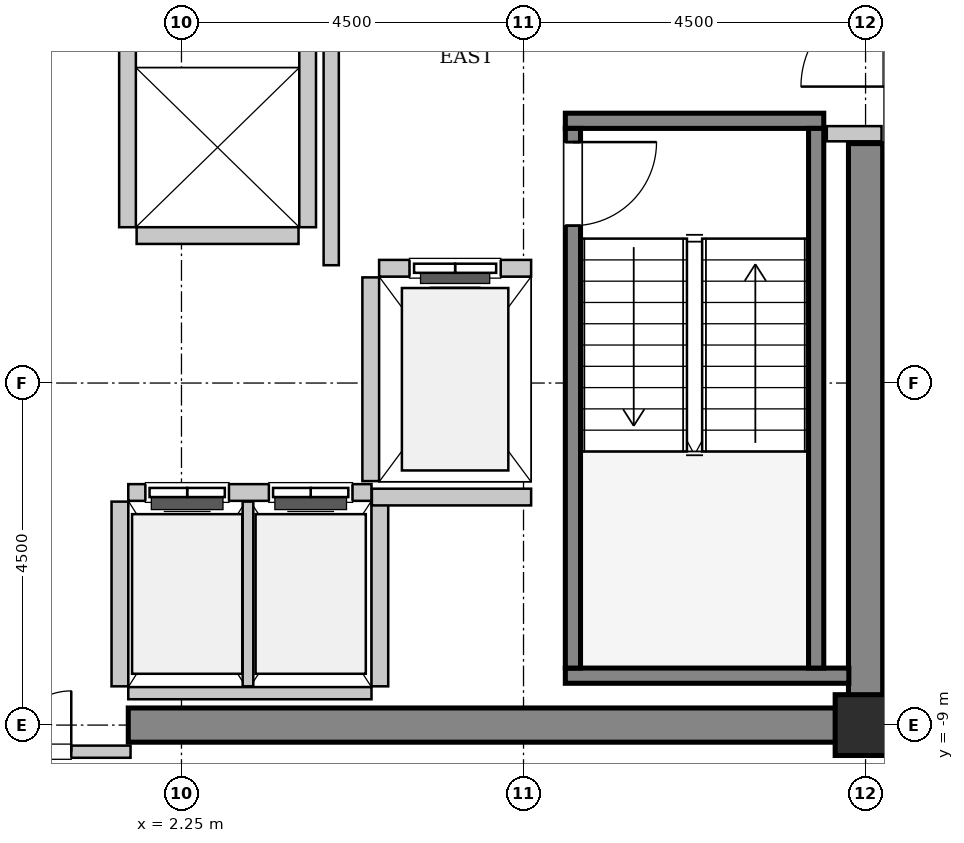
"""IFC4 building model, lengths in metres.
Left out: names, types, materials, properties, quantities, classifications, styles, units other than length and angle.
Written with IfcOpenShell. Run it as: python <this file> out.ifc"""

import sys

from ifc_helpers import new_model, si_unit, direction, frame, frame_2d, origin, origin_2d, place, context, subcontext, project, spatial, rectangle, hollow_rectangle, extrude, source, transform, mapped, element, fill, save


model = new_model("IFC4")
c1 = context("Model", 3, precision=1e-05, world=origin(), true_north=direction((0.0, 1.0)))
c2 = subcontext(c1, "Body", "Model", "MODEL_VIEW")
j1 = project(units=[si_unit("LENGTHUNIT", "METRE"), si_unit("PLANEANGLEUNIT", "RADIAN")], contexts=[c1])
p1 = place(None, origin())
s1 = spatial("IfcSite", under=j1, at=p1, CompositionType="ELEMENT")
p2 = place(p1, origin())
s2 = spatial("IfcBuilding", under=s1, at=p2, CompositionType="ELEMENT")
p3 = place(p2, frame((0.0, 0.0, 233.2)))
s3 = spatial("IfcBuildingStorey", under=s2, at=p3, CompositionType="ELEMENT", Elevation=233.2)
m1 = source(origin(), c2, "Body", "SweptSolid", [
    extrude(rectangle(XDim=9.925, YDim=0.45, at=frame_2d((4.962, 0.0))), origin(), (0.0, 0.0, 1.0), 3.8),
])
p4 = place(p3, frame((1.55, -9.0, 0.0), z_axis=(0.0, 0.0, 1.0), x_axis=(1.0, 0.0, 0.0)))
e1 = element("IfcWall", 1, at=p4, inside=s3, PredefinedType="SHEAR", context=c2, shape_type="MappedRepresentation", body=[
    mapped(m1, transform((0.0, 0.0, 0.0), x_axis=(1.0, 0.0, 0.0), y_axis=(0.0, 1.0, 0.0), z_axis=(0.0, 0.0, 1.0), scale=1.0)),
])
m2 = source(origin(), c2, "Body", "SweptSolid", [
    extrude(rectangle(XDim=7.425, YDim=0.45, at=frame_2d((3.712, 0.0))), origin(), (0.0, 0.0, 1.0), 3.8),
])
p5 = place(p3, frame((11.25, -8.775, 0.0), z_axis=(0.0, 0.0, 1.0), x_axis=(0.0, 1.0, 0.0)))
e2 = element("IfcWall", 2, at=p5, inside=s3, PredefinedType="SHEAR", context=c2, shape_type="MappedRepresentation", body=[
    mapped(m2, transform((0.0, 0.0, 0.0), x_axis=(1.0, 0.0, 0.0), y_axis=(0.0, 1.0, 0.0), z_axis=(0.0, 0.0, 1.0), scale=1.0)),
])
m3 = source(origin(), c2, "Body", "SweptSolid", [
    extrude(hollow_rectangle(XDim=0.8, YDim=0.8, WallThickness=0.04, InnerFilletRadius=0.04, OuterFilletRadius=0.08, at=origin_2d()), origin(), (0.0, 0.0, 1.0), 3.8),
])
p6 = place(p3, frame((11.25, -9.0, 0.0), z_axis=(0.0, 0.0, 1.0), x_axis=(1.0, 0.0, 0.0)))
e3 = element("IfcColumn", 3, at=p6, inside=s3, PredefinedType="COLUMN", context=c2, shape_type="MappedRepresentation", body=[
    mapped(m3, transform((0.0, 0.0, 0.0), x_axis=(1.0, 0.0, 0.0), y_axis=(0.0, 1.0, 0.0), z_axis=(0.0, 0.0, 1.0), scale=1.0)),
])
m4 = source(origin(), c2, "Body", "SweptSolid", [
    extrude(rectangle(XDim=3.4, YDim=0.2, at=frame_2d((1.7, 0.0))), origin(), (0.0, 0.0, 1.0), 3.8),
])
p7 = place(p3, frame((7.3, -1.05, 0.0), z_axis=(0.0, 0.0, 1.0), x_axis=(1.0, 0.0, 0.0)))
e4 = element("IfcWall", 4, at=p7, inside=s3, PredefinedType="SOLIDWALL", context=c2, shape_type="MappedRepresentation", body=[
    mapped(m4, transform((0.0, 0.0, 0.0), x_axis=(1.0, 0.0, 0.0), y_axis=(0.0, 1.0, 0.0), z_axis=(0.0, 0.0, 1.0), scale=1.0)),
])
m5 = source(origin(), c2, "Body", "SweptSolid", [
    extrude(rectangle(XDim=3.73, YDim=0.2, at=frame_2d((1.865, 0.0))), origin(), (0.0, 0.0, 1.0), 3.8),
])
p8 = place(p3, frame((7.3, -8.35, 0.0), z_axis=(0.0, 0.0, 1.0), x_axis=(1.0, 0.0, 0.0)))
e5 = element("IfcWall", 5, at=p8, inside=s3, PredefinedType="SOLIDWALL", context=c2, shape_type="MappedRepresentation", body=[
    mapped(m5, transform((0.0, 0.0, 0.0), x_axis=(1.0, 0.0, 0.0), y_axis=(0.0, 1.0, 0.0), z_axis=(0.0, 0.0, 1.0), scale=1.0)),
])
m6 = source(origin(), c2, "Body", "SweptSolid", [
    extrude(rectangle(XDim=7.1, YDim=0.2, at=frame_2d((3.55, 0.0))), origin(), (0.0, 0.0, 1.0), 3.8),
])
p9 = place(p3, frame((7.4, -1.15, 0.0), z_axis=(0.0, 0.0, 1.0), x_axis=(0.0, -1.0, 0.0)))
e6 = element("IfcWall", 6, at=p9, inside=s3, PredefinedType="SOLIDWALL", context=c2, shape_type="MappedRepresentation", body=[
    mapped(m6, transform((0.0, 0.0, 0.0), x_axis=(1.0, 0.0, 0.0), y_axis=(0.0, 1.0, 0.0), z_axis=(0.0, 0.0, 1.0), scale=1.0)),
])
p10 = place(p9, frame((0.18, 0.0, 0.0)))
e7 = element("IfcOpeningElement", 7, at=p10, cuts=e6, PredefinedType="OPENING", context=c2, shape_type="SweptSolid", body=[
    extrude(rectangle(XDim=1.1, YDim=2.15, at=frame_2d((0.55, 1.075))), frame((0.0, 0.11, 0.0), z_axis=(0.0, -1.0, 0.0), x_axis=(1.0, 0.0, 0.0)), (0.0, 0.0, 1.0), 0.22),
])
p11 = place(p3, frame((10.6, -1.15, 0.0), z_axis=(0.0, 0.0, 1.0), x_axis=(0.0, -1.0, 0.0)))
e8 = element("IfcWall", 8, at=p11, inside=s3, PredefinedType="SOLIDWALL", context=c2, shape_type="MappedRepresentation", body=[
    mapped(m6, transform((0.0, 0.0, 0.0), x_axis=(1.0, 0.0, 0.0), y_axis=(0.0, 1.0, 0.0), z_axis=(0.0, 0.0, 1.0), scale=1.0)),
])
m7 = source(origin(), c2, "Body", "SweptSolid", [
    extrude(rectangle(XDim=2.0, YDim=0.22, at=frame_2d((1.0, 0.0))), origin(), (0.0, 0.0, 1.0), 3.535),
])
p12 = place(p3, frame((6.85, -2.99, 0.0), z_axis=(0.0, 0.0, 1.0), x_axis=(-1.0, 0.0, 0.0)))
e9 = element("IfcWall", 9, at=p12, inside=s3, PredefinedType="SOLIDWALL", context=c2, shape_type="MappedRepresentation", body=[
    mapped(m7, transform((0.0, 0.0, 0.0), x_axis=(1.0, 0.0, 0.0), y_axis=(0.0, 1.0, 0.0), z_axis=(0.0, 0.0, 1.0), scale=1.0)),
])
p13 = place(p12, frame((0.4, 0.0, 0.0)))
e10 = element("IfcOpeningElement", 10, at=p13, cuts=e9, PredefinedType="OPENING", context=c2, shape_type="SweptSolid", body=[
    extrude(rectangle(XDim=1.2, YDim=2.2, at=frame_2d((0.6, 1.1))), frame((0.0, 0.12, 0.0), z_axis=(0.0, -1.0, 0.0), x_axis=(1.0, 0.0, 0.0)), (0.0, 0.0, 1.0), 0.24),
])
m8 = source(origin(), c2, "Body", "SweptSolid", [
    extrude(rectangle(XDim=2.68, YDim=0.22, at=frame_2d((1.34, 0.0))), origin(), (0.0, 0.0, 1.0), 3.535),
])
p14 = place(p3, frame((4.74, -3.11, 0.0), z_axis=(0.0, 0.0, 1.0), x_axis=(0.0, -1.0, 0.0)))
e11 = element("IfcWall", 11, at=p14, inside=s3, PredefinedType="SOLIDWALL", context=c2, shape_type="MappedRepresentation", body=[
    mapped(m8, transform((0.0, 0.0, 0.0), x_axis=(1.0, 0.0, 0.0), y_axis=(0.0, 1.0, 0.0), z_axis=(0.0, 0.0, 1.0), scale=1.0)),
])
m9 = source(origin(), c2, "Body", "SweptSolid", [
    extrude(rectangle(XDim=3.2, YDim=0.22, at=frame_2d((1.6, 0.0))), origin(), (0.0, 0.0, 1.0), 3.535),
])
p15 = place(p3, frame((4.75, -5.94, 0.0), z_axis=(0.0, 0.0, 1.0), x_axis=(-1.0, 0.0, 0.0)))
e12 = element("IfcWall", 12, at=p15, inside=s3, PredefinedType="SOLIDWALL", context=c2, shape_type="MappedRepresentation", body=[
    mapped(m9, transform((0.0, 0.0, 0.0), x_axis=(1.0, 0.0, 0.0), y_axis=(0.0, 1.0, 0.0), z_axis=(0.0, 0.0, 1.0), scale=1.0)),
])
p16 = place(p15, frame((1.875, 0.0, 0.0)))
e13 = element("IfcOpeningElement", 13, at=p16, cuts=e12, PredefinedType="OPENING", context=c2, shape_type="SweptSolid", body=[
    extrude(rectangle(XDim=1.1, YDim=2.2, at=frame_2d((0.55, 1.1))), frame((0.0, 0.12, 0.0), z_axis=(0.0, -1.0, 0.0), x_axis=(1.0, 0.0, 0.0)), (0.0, 0.0, 1.0), 0.24),
])
p17 = place(p15, frame((0.25, 0.0, 0.0)))
e14 = element("IfcOpeningElement", 14, at=p17, cuts=e12, PredefinedType="OPENING", context=c2, shape_type="SweptSolid", body=[
    extrude(rectangle(XDim=1.1, YDim=2.2, at=frame_2d((0.55, 1.1))), frame((0.0, 0.12, 0.0), z_axis=(0.0, -1.0, 0.0), x_axis=(1.0, 0.0, 0.0)), (0.0, 0.0, 1.0), 0.24),
])
m10 = source(origin(), c2, "Body", "SweptSolid", [
    extrude(rectangle(XDim=3.2, YDim=0.16, at=frame_2d((1.6, 0.0))), origin(), (0.0, 0.0, 1.0), 2.625),
])
p18 = place(p3, frame((1.55, -8.58, 0.0), z_axis=(0.0, 0.0, 1.0), x_axis=(1.0, 0.0, 0.0)))
e15 = element("IfcWall", 15, at=p18, inside=s3, PredefinedType="PARTITIONING", context=c2, shape_type="MappedRepresentation", body=[
    mapped(m10, transform((0.0, 0.0, 0.0), x_axis=(1.0, 0.0, 0.0), y_axis=(0.0, 1.0, 0.0), z_axis=(0.0, 0.0, 1.0), scale=1.0)),
])
m11 = source(origin(), c2, "Body", "SweptSolid", [
    extrude(rectangle(XDim=2.43, YDim=0.22, at=frame_2d((1.215, 0.0))), origin(), (0.0, 0.0, 1.0), 3.535),
])
p19 = place(p3, frame((1.44, -6.06, 0.0), z_axis=(0.0, 0.0, 1.0), x_axis=(0.0, -1.0, 0.0)))
e16 = element("IfcWall", 16, at=p19, inside=s3, PredefinedType="SOLIDWALL", context=c2, shape_type="MappedRepresentation", body=[
    mapped(m11, transform((0.0, 0.0, 0.0), x_axis=(1.0, 0.0, 0.0), y_axis=(0.0, 1.0, 0.0), z_axis=(0.0, 0.0, 1.0), scale=1.0)),
])
m12 = source(origin(), c2, "Body", "SweptSolid", [
    extrude(rectangle(XDim=2.43, YDim=0.14, at=frame_2d((1.215, 0.0))), origin(), (0.0, 0.0, 1.0), 3.535),
])
p20 = place(p3, frame((3.125, -8.49, 0.0), z_axis=(0.0, 0.0, 1.0), x_axis=(0.0, 1.0, 0.0)))
e17 = element("IfcWall", 17, at=p20, inside=s3, PredefinedType="PARTITIONING", context=c2, shape_type="MappedRepresentation", body=[
    mapped(m12, transform((0.0, 0.0, 0.0), x_axis=(1.0, 0.0, 0.0), y_axis=(0.0, 1.0, 0.0), z_axis=(0.0, 0.0, 1.0), scale=1.0)),
])
p21 = place(p3, frame((4.86, -8.49, 0.0), z_axis=(0.0, 0.0, 1.0), x_axis=(0.0, 1.0, 0.0)))
e18 = element("IfcWall", 18, at=p21, inside=s3, PredefinedType="SOLIDWALL", context=c2, shape_type="MappedRepresentation", body=[
    mapped(m11, transform((0.0, 0.0, 0.0), x_axis=(1.0, 0.0, 0.0), y_axis=(0.0, 1.0, 0.0), z_axis=(0.0, 0.0, 1.0), scale=1.0)),
])
m13 = source(origin(), c2, "Body", "SweptSolid", [
    extrude(rectangle(XDim=4.9, YDim=0.22, at=frame_2d((2.45, 0.0))), origin(), (0.0, 0.0, 1.0), 3.535),
])
for number, where, z_axis, x_axis in (
    (19, (1.54, 2.45, 0.0), (0.0, 0.0, 1.0), (0.0, -1.0, 0.0)),
    (20, (3.91, -2.45, 0.0), (0.0, 0.0, 1.0), (0.0, 1.0, 0.0)),
):
    element("IfcWall", number, at=place(p3, frame(where, z_axis=z_axis, x_axis=x_axis)), inside=s3, PredefinedType="SOLIDWALL", context=c2, shape_type="MappedRepresentation", body=[
        mapped(m13, transform((0.0, 0.0, 0.0), x_axis=(1.0, 0.0, 0.0), y_axis=(0.0, 1.0, 0.0), z_axis=(0.0, 0.0, 1.0), scale=1.0)),
    ])
m14 = source(origin(), c2, "Body", "SweptSolid", [
    extrude(rectangle(XDim=2.13, YDim=0.22, at=frame_2d((1.065, 0.0))), origin(), (0.0, 0.0, 1.0), 3.535),
])
p22 = place(p3, frame((1.66, -2.56, 0.0), z_axis=(0.0, 0.0, 1.0), x_axis=(1.0, 0.0, 0.0)))
e21 = element("IfcWall", 21, at=p22, inside=s3, PredefinedType="SOLIDWALL", context=c2, shape_type="MappedRepresentation", body=[
    mapped(m14, transform((0.0, 0.0, 0.0), x_axis=(1.0, 0.0, 0.0), y_axis=(0.0, 1.0, 0.0), z_axis=(0.0, 0.0, 1.0), scale=1.0)),
])
m15 = source(origin(), c2, "Body", "SweptSolid", [
    extrude(rectangle(XDim=2.095, YDim=0.22, at=frame_2d((1.048, 0.0))), origin(), (0.0, 0.0, 1.0), 3.535),
])
p23 = place(p3, frame((4.755, -6.0, 0.0), z_axis=(0.0, 0.0, 1.0), x_axis=(1.0, 0.0, 0.0)))
e22 = element("IfcWall", 22, at=p23, inside=s3, PredefinedType="SOLIDWALL", context=c2, shape_type="MappedRepresentation", body=[
    mapped(m15, transform((0.0, 0.0, 0.0), x_axis=(1.0, 0.0, 0.0), y_axis=(0.0, 1.0, 0.0), z_axis=(0.0, 0.0, 1.0), scale=1.0)),
])
m16 = source(origin(), c2, "Body", "SweptSolid", [
    extrude(rectangle(XDim=5.9, YDim=0.2, at=frame_2d((2.95, 0.0))), origin(), (0.0, 0.0, 1.0), 3.535),
])
p24 = place(p3, frame((4.22, -2.95, 0.0), z_axis=(0.0, 0.0, 1.0), x_axis=(0.0, 1.0, 0.0)))
e23 = element("IfcWall", 23, at=p24, inside=s3, PredefinedType="PARTITIONING", context=c2, shape_type="MappedRepresentation", body=[
    mapped(m16, transform((0.0, 0.0, 0.0), x_axis=(1.0, 0.0, 0.0), y_axis=(0.0, 1.0, 0.0), z_axis=(0.0, 0.0, 1.0), scale=1.0)),
])
m17 = source(origin(), c2, "Body", "SweptSolid", [
    extrude(rectangle(XDim=0.72, YDim=0.2, at=frame_2d((0.36, 0.0))), origin(), (0.0, 0.0, 1.0), 3.535),
])
p25 = place(p3, frame((10.74, -1.22, 0.0), z_axis=(0.0, 0.0, 1.0), x_axis=(1.0, 0.0, 0.0)))
e24 = element("IfcWall", 24, at=p25, inside=s3, PredefinedType="PARTITIONING", context=c2, shape_type="MappedRepresentation", body=[
    mapped(m17, transform((0.0, 0.0, 0.0), x_axis=(1.0, 0.0, 0.0), y_axis=(0.0, 1.0, 0.0), z_axis=(0.0, 0.0, 1.0), scale=1.0)),
])
m18 = source(origin(), c2, "Body", "SweptSolid", [
    extrude(rectangle(XDim=3.16, YDim=0.16, at=frame_2d((1.58, 0.0))), origin(), (0.0, 0.0, 1.0), 2.625),
])
p26 = place(p3, frame((-1.58, -9.35, 0.0), z_axis=(0.0, 0.0, 1.0), x_axis=(1.0, 0.0, 0.0)))
e25 = element("IfcWall", 25, at=p26, inside=s3, PredefinedType="PARTITIONING", context=c2, shape_type="MappedRepresentation", body=[
    mapped(m18, transform((0.0, 0.0, 0.0), x_axis=(1.0, 0.0, 0.0), y_axis=(0.0, 1.0, 0.0), z_axis=(0.0, 0.0, 1.0), scale=1.0)),
])
p27 = place(p26, frame((0.78, 0.0, 0.0)))
e26 = element("IfcOpeningElement", 26, at=p27, cuts=e25, PredefinedType="OPENING", context=c2, shape_type="SweptSolid", body=[
    extrude(rectangle(XDim=1.6, YDim=2.3, at=frame_2d((0.8, 1.15))), frame((0.0, 0.09, 0.0), z_axis=(0.0, -1.0, 0.0), x_axis=(1.0, 0.0, 0.0)), (0.0, 0.0, 1.0), 0.18),
])
m19 = source(origin(), c2, "Body", "SweptSolid", [
    extrude(rectangle(XDim=1.1, YDim=2.15, at=frame_2d((0.55, 1.075))), frame((0.0, 0.025, 0.0), z_axis=(0.0, -1.0, 0.0), x_axis=(1.0, 0.0, 0.0)), (0.0, 0.0, 1.0), 0.05),
])
p28 = place(p10, origin())
e27 = element("IfcDoor", 27, at=p28, inside=s3, OperationType="SINGLE_SWING_LEFT", PredefinedType="DOOR", context=c2, shape_type="MappedRepresentation", body=[
    mapped(m19, transform((0.0, 0.0, 0.0), x_axis=(1.0, 0.0, 0.0), y_axis=(0.0, 1.0, 0.0), z_axis=(0.0, 0.0, 1.0), scale=1.0)),
])
fill(e7, e27)
m20 = source(origin(), c2, "Body", "SweptSolid", [
    extrude(rectangle(XDim=1.2, YDim=2.2, at=frame_2d((0.6, 1.1))), frame((0.0, 0.025, 0.0), z_axis=(0.0, -1.0, 0.0), x_axis=(1.0, 0.0, 0.0)), (0.0, 0.0, 1.0), 0.05),
])
p29 = place(p13, origin())
e28 = element("IfcDoor", 28, at=p29, inside=s3, OperationType="SLIDING_TO_LEFT", PredefinedType="DOOR", context=c2, shape_type="MappedRepresentation", body=[
    mapped(m20, transform((0.0, 0.0, 0.0), x_axis=(1.0, 0.0, 0.0), y_axis=(0.0, 1.0, 0.0), z_axis=(0.0, 0.0, 1.0), scale=1.0)),
])
fill(e10, e28)
m21 = source(origin(), c2, "Body", "SweptSolid", [
    extrude(rectangle(XDim=1.1, YDim=2.2, at=frame_2d((0.55, 1.1))), frame((0.0, 0.025, 0.0), z_axis=(0.0, -1.0, 0.0), x_axis=(1.0, 0.0, 0.0)), (0.0, 0.0, 1.0), 0.05),
])
p30 = place(p16, origin())
e29 = element("IfcDoor", 29, at=p30, inside=s3, OperationType="DOUBLE_DOOR_SLIDING", PredefinedType="DOOR", context=c2, shape_type="MappedRepresentation", body=[
    mapped(m21, transform((0.0, 0.0, 0.0), x_axis=(1.0, 0.0, 0.0), y_axis=(0.0, 1.0, 0.0), z_axis=(0.0, 0.0, 1.0), scale=1.0)),
])
fill(e13, e29)
p31 = place(p17, origin())
e30 = element("IfcDoor", 30, at=p31, inside=s3, OperationType="DOUBLE_DOOR_SLIDING", PredefinedType="DOOR", context=c2, shape_type="MappedRepresentation", body=[
    mapped(m21, transform((0.0, 0.0, 0.0), x_axis=(1.0, 0.0, 0.0), y_axis=(0.0, 1.0, 0.0), z_axis=(0.0, 0.0, 1.0), scale=1.0)),
])
fill(e14, e30)
m22 = source(origin(), c2, "Body", "SweptSolid", [
    extrude(rectangle(XDim=1.6, YDim=2.3, at=frame_2d((0.8, 1.15))), frame((0.0, 0.025, 0.0), z_axis=(0.0, -1.0, 0.0), x_axis=(1.0, 0.0, 0.0)), (0.0, 0.0, 1.0), 0.05),
])
p32 = place(p27, origin())
e31 = element("IfcDoor", 31, at=p32, inside=s3, OperationType="DOUBLE_DOOR_SINGLE_SWING", PredefinedType="DOOR", context=c2, shape_type="MappedRepresentation", body=[
    mapped(m22, transform((0.0, 0.0, 0.0), x_axis=(1.0, 0.0, 0.0), y_axis=(0.0, 1.0, 0.0), z_axis=(0.0, 0.0, 1.0), scale=1.0)),
])
fill(e26, e31)
save(model, sys.argv[1])
